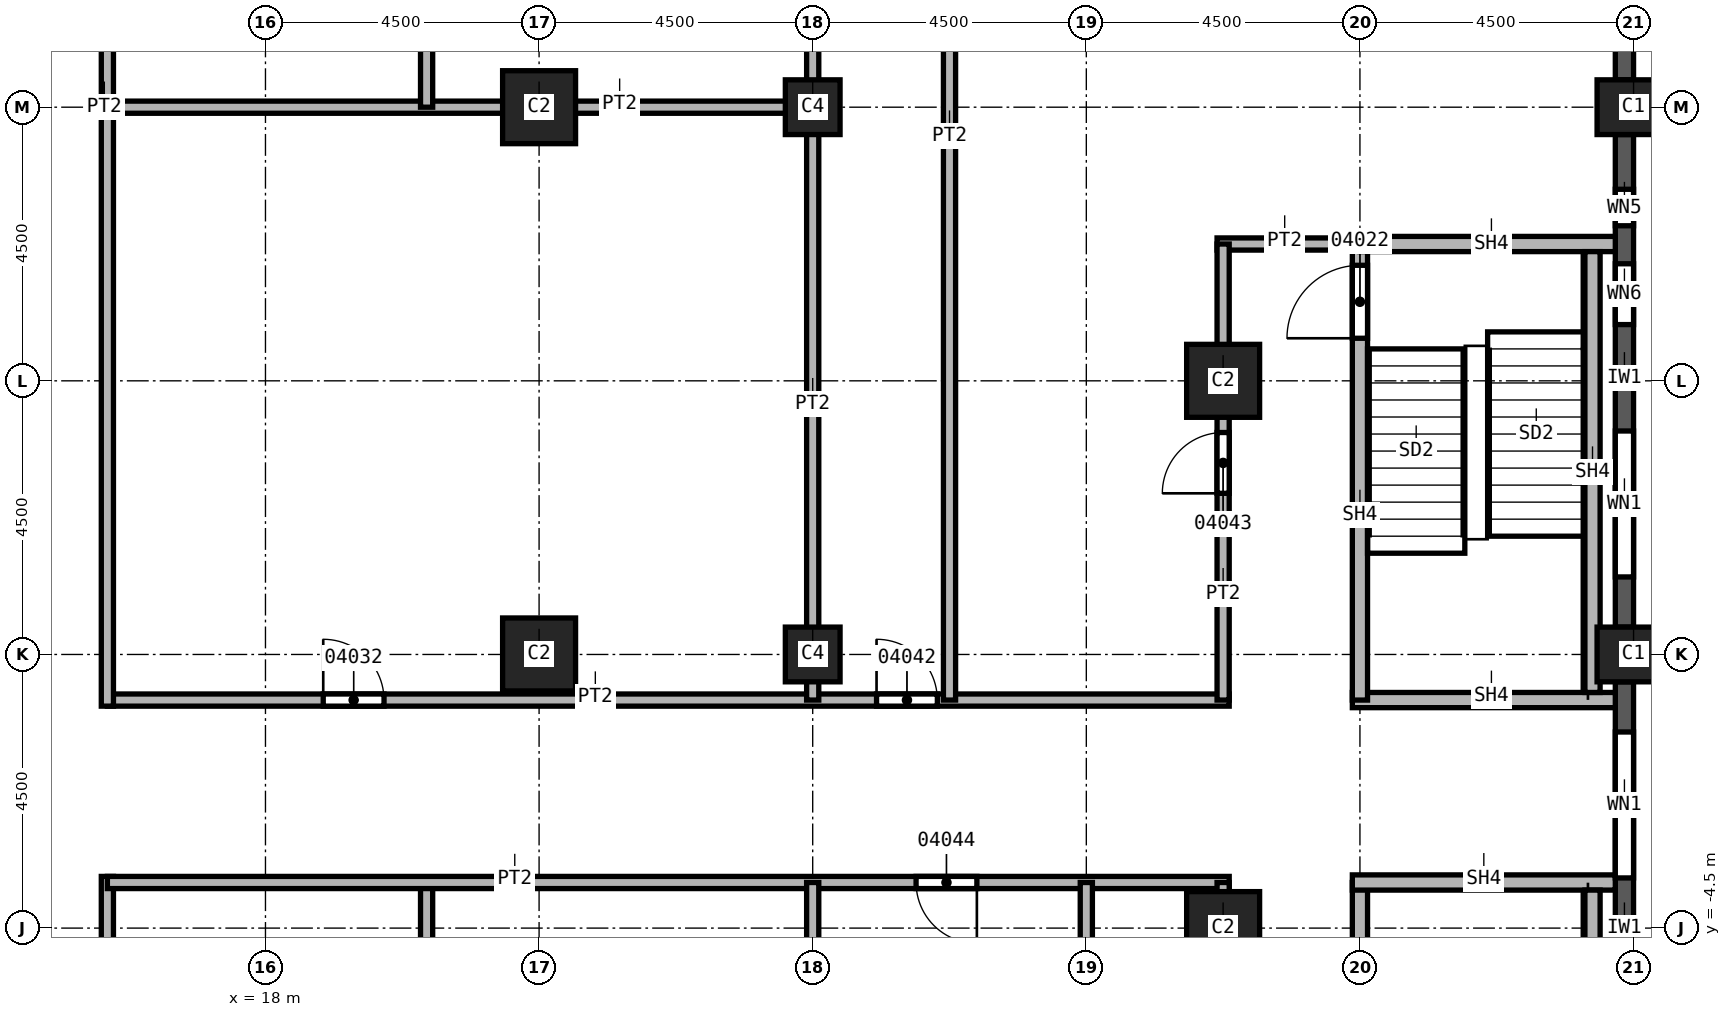
"""IFC4 building model, lengths in metres.
Left out: names, types, materials, properties, quantities, classifications, styles, units other than length and angle.
Written with IfcOpenShell. Run it as: python <this file> out.ifc"""

import sys

from ifc_helpers import new_model, si_unit, direction, frame, frame_2d, origin, origin_2d, place, context, subcontext, project, spatial, rectangle, extrude, element, fill, save


model = new_model("IFC4")
c1 = context("Model", 3, precision=1e-05, world=origin(), true_north=direction((0.0, 1.0)))
c2 = subcontext(c1, "Body", "Model", "MODEL_VIEW")
j1 = project(units=[si_unit("LENGTHUNIT", "METRE"), si_unit("PLANEANGLEUNIT", "RADIAN")], contexts=[c1])
p1 = place(None, origin())
s1 = spatial("IfcSite", under=j1, at=p1, CompositionType="ELEMENT")
p2 = place(p1, origin())
s2 = spatial("IfcBuilding", under=s1, at=p2, CompositionType="ELEMENT")
p3 = place(p2, frame((0.0, 0.0, 104.0)))
s3 = spatial("IfcBuildingStorey", under=s2, at=p3, CompositionType="ELEMENT", Elevation=104.0)
for number, where, z_axis, x_axis in (
    (1, (40.5, 0.0, 0.0), (0.0, 0.0, 1.0), (0.0, 1.0, 0.0)),
    (2, (40.5, 9.0, 0.0), (0.0, 0.0, 1.0), (0.0, 1.0, 0.0)),
):
    element("IfcColumn", number, at=place(p3, frame(where, z_axis=z_axis, x_axis=x_axis)), inside=s3, PredefinedType="COLUMN", context=c2, shape_type="SweptSolid", body=[
        extrude(rectangle(XDim=0.9, YDim=1.2, at=origin_2d()), origin(), (0.0, 0.0, 1.0), 3.7),
    ])
for number, where, z_axis, x_axis in (
    (3, (33.75, 4.5, 0.0), (0.0, 0.0, 1.0), (1.0, 0.0, 0.0)),
    (4, (33.75, -4.5, 0.0), (0.0, 0.0, 1.0), (1.0, 0.0, 0.0)),
    (5, (22.5, 0.0, 0.0), (0.0, 0.0, 1.0), (1.0, 0.0, 0.0)),
    (6, (22.5, 9.0, 0.0), (0.0, 0.0, 1.0), (1.0, 0.0, 0.0)),
):
    element("IfcColumn", number, at=place(p3, frame(where, z_axis=z_axis, x_axis=x_axis)), inside=s3, PredefinedType="COLUMN", context=c2, shape_type="SweptSolid", body=[
        extrude(rectangle(XDim=1.2, YDim=1.2, at=origin_2d()), origin(), (0.0, 0.0, 1.0), 3.7),
    ])
for number, where, z_axis, x_axis in (
    (7, (27.0, 0.0, 0.0), (0.0, 0.0, 1.0), (1.0, 0.0, 0.0)),
    (8, (27.0, 9.0, 0.0), (0.0, 0.0, 1.0), (1.0, 0.0, 0.0)),
):
    element("IfcColumn", number, at=place(p3, frame(where, z_axis=z_axis, x_axis=x_axis)), inside=s3, PredefinedType="COLUMN", context=c2, shape_type="SweptSolid", body=[
        extrude(rectangle(XDim=0.9, YDim=0.9, at=origin_2d()), origin(), (0.0, 0.0, 1.0), 3.7),
    ])
p4 = place(p3, frame((40.35, -8.55, 0.0), z_axis=(0.0, 0.0, 1.0), x_axis=(0.0, 1.0, 0.0)))
e9 = element("IfcWall", 9, at=p4, inside=s3, PredefinedType="SOLIDWALL", context=c2, shape_type="SweptSolid", body=[
    extrude(rectangle(XDim=8.1, YDim=0.3, at=frame_2d((4.05, 0.0))), origin(), (0.0, 0.0, 1.0), 3.1),
])
p5 = place(p4, frame((0.825, 0.0, 0.8)))
e10 = element("IfcOpeningElement", 10, at=p5, cuts=e9, PredefinedType="OPENING", context=c2, shape_type="SweptSolid", body=[
    extrude(rectangle(XDim=2.4, YDim=1.95, at=frame_2d((1.2, 0.975))), frame((0.0, 0.15, 0.0), z_axis=(0.0, -1.0, 0.0), x_axis=(1.0, 0.0, 0.0)), (0.0, 0.0, 1.0), 0.3),
])
p6 = place(p4, frame((4.875, 0.0, 0.8)))
e11 = element("IfcOpeningElement", 11, at=p6, cuts=e9, PredefinedType="OPENING", context=c2, shape_type="SweptSolid", body=[
    extrude(rectangle(XDim=2.4, YDim=1.95, at=frame_2d((1.2, 0.975))), frame((0.0, 0.15, 0.0), z_axis=(0.0, -1.0, 0.0), x_axis=(1.0, 0.0, 0.0)), (0.0, 0.0, 1.0), 0.3),
])
p7 = place(p3, frame((40.35, 0.45, 0.0), z_axis=(0.0, 0.0, 1.0), x_axis=(0.0, 1.0, 0.0)))
e12 = element("IfcWall", 12, at=p7, inside=s3, PredefinedType="SOLIDWALL", context=c2, shape_type="SweptSolid", body=[
    extrude(rectangle(XDim=8.1, YDim=0.3, at=frame_2d((4.05, 0.0))), origin(), (0.0, 0.0, 1.0), 3.1),
])
p8 = place(p7, frame((0.825, 0.0, 0.8)))
e13 = element("IfcOpeningElement", 13, at=p8, cuts=e12, PredefinedType="OPENING", context=c2, shape_type="SweptSolid", body=[
    extrude(rectangle(XDim=2.4, YDim=1.95, at=frame_2d((1.2, 0.975))), frame((0.0, 0.15, 0.0), z_axis=(0.0, -1.0, 0.0), x_axis=(1.0, 0.0, 0.0)), (0.0, 0.0, 1.0), 0.3),
])
p9 = place(p7, frame((4.975, 0.0, 0.8)))
e14 = element("IfcOpeningElement", 14, at=p9, cuts=e12, PredefinedType="OPENING", context=c2, shape_type="SweptSolid", body=[
    extrude(rectangle(XDim=1.0, YDim=1.95, at=frame_2d((0.5, 0.975))), frame((0.0, 0.15, 0.0), z_axis=(0.0, -1.0, 0.0), x_axis=(1.0, 0.0, 0.0)), (0.0, 0.0, 1.0), 0.3),
])
p10 = place(p7, frame((6.6, 0.0, 0.8)))
e15 = element("IfcOpeningElement", 15, at=p10, cuts=e12, PredefinedType="OPENING", context=c2, shape_type="SweptSolid", body=[
    extrude(rectangle(XDim=0.6, YDim=1.95, at=frame_2d((0.3, 0.975))), frame((0.0, 0.15, 0.0), z_axis=(0.0, -1.0, 0.0), x_axis=(1.0, 0.0, 0.0)), (0.0, 0.0, 1.0), 0.3),
])
p11 = place(p3, frame((40.35, 9.45, 0.0), z_axis=(0.0, 0.0, 1.0), x_axis=(0.0, 1.0, 0.0)))
e16 = element("IfcWall", 16, at=p11, inside=s3, PredefinedType="SOLIDWALL", context=c2, shape_type="SweptSolid", body=[
    extrude(rectangle(XDim=3.6, YDim=0.3, at=frame_2d((1.8, 0.0))), origin(), (0.0, 0.0, 1.0), 3.1),
])
p12 = place(p11, frame((0.6, 0.0, 0.8)))
e17 = element("IfcOpeningElement", 17, at=p12, cuts=e16, PredefinedType="OPENING", context=c2, shape_type="SweptSolid", body=[
    extrude(rectangle(XDim=2.4, YDim=1.95, at=frame_2d((1.2, 0.975))), frame((0.0, 0.15, 0.0), z_axis=(0.0, -1.0, 0.0), x_axis=(1.0, 0.0, 0.0)), (0.0, 0.0, 1.0), 0.3),
])
p13 = place(p3, frame((15.4, -3.65, 0.0), z_axis=(0.0, 0.0, 1.0), x_axis=(0.0, -1.0, 0.0)))
e18 = element("IfcWall", 18, at=p13, inside=s3, PredefinedType="PARTITIONING", context=c2, shape_type="SweptSolid", body=[
    extrude(rectangle(XDim=20.85, YDim=0.2, at=frame_2d((10.425, 0.0))), origin(), (0.0, 0.0, 1.0), 3.7),
])
p14 = place(p13, frame((18.85, 0.0, 0.0)))
e19 = element("IfcOpeningElement", 19, at=p14, cuts=e18, PredefinedType="OPENING", context=c2, shape_type="SweptSolid", body=[
    extrude(rectangle(XDim=1.0, YDim=2.1, at=frame_2d((0.5, 1.05))), frame((0.0, 0.1, 0.0), z_axis=(0.0, -1.0, 0.0), x_axis=(1.0, 0.0, 0.0)), (0.0, 0.0, 1.0), 0.2),
])
p15 = place(p13, frame((12.55, 0.0, 0.0)))
e20 = element("IfcOpeningElement", 20, at=p15, cuts=e18, PredefinedType="OPENING", context=c2, shape_type="SweptSolid", body=[
    extrude(rectangle(XDim=1.0, YDim=2.1, at=frame_2d((0.5, 1.05))), frame((0.0, 0.1, 0.0), z_axis=(0.0, -1.0, 0.0), x_axis=(1.0, 0.0, 0.0)), (0.0, 0.0, 1.0), 0.2),
])
p16 = place(p13, frame((4.45, 0.0, 0.0)))
e21 = element("IfcOpeningElement", 21, at=p16, cuts=e18, PredefinedType="OPENING", context=c2, shape_type="SweptSolid", body=[
    extrude(rectangle(XDim=1.0, YDim=2.1, at=frame_2d((0.5, 1.05))), frame((0.0, 0.1, 0.0), z_axis=(0.0, -1.0, 0.0), x_axis=(1.0, 0.0, 0.0)), (0.0, 0.0, 1.0), 0.2),
])
p17 = place(p3, frame((15.4, -0.75, 0.0), z_axis=(0.0, 0.0, 1.0), x_axis=(1.0, 0.0, 0.0)))
e22 = element("IfcWall", 22, at=p17, inside=s3, PredefinedType="PARTITIONING", context=c2, shape_type="SweptSolid", body=[
    extrude(rectangle(XDim=18.45, YDim=0.2, at=frame_2d((9.225, 0.0))), origin(), (0.0, 0.0, 1.0), 3.7),
])
p18 = place(p17, frame((3.55, 0.0, 0.0)))
e23 = element("IfcOpeningElement", 23, at=p18, cuts=e22, PredefinedType="OPENING", context=c2, shape_type="SweptSolid", body=[
    extrude(rectangle(XDim=1.0, YDim=2.1, at=frame_2d((0.5, 1.05))), frame((0.0, 0.1, 0.0), z_axis=(0.0, -1.0, 0.0), x_axis=(1.0, 0.0, 0.0)), (0.0, 0.0, 1.0), 0.2),
])
p19 = place(p17, frame((12.65, 0.0, 0.0)))
e24 = element("IfcOpeningElement", 24, at=p19, cuts=e22, PredefinedType="OPENING", context=c2, shape_type="SweptSolid", body=[
    extrude(rectangle(XDim=1.0, YDim=2.1, at=frame_2d((0.5, 1.05))), frame((0.0, 0.1, 0.0), z_axis=(0.0, -1.0, 0.0), x_axis=(1.0, 0.0, 0.0)), (0.0, 0.0, 1.0), 0.2),
])
p20 = place(p3, frame((15.4, 9.0, 0.0), z_axis=(0.0, 0.0, 1.0), x_axis=(1.0, 0.0, 0.0)))
e25 = element("IfcWall", 25, at=p20, inside=s3, PredefinedType="PARTITIONING", context=c2, shape_type="SweptSolid", body=[
    extrude(rectangle(XDim=11.7, YDim=0.2, at=frame_2d((5.85, 0.0))), origin(), (0.0, 0.0, 1.0), 3.7),
])
p21 = place(p3, frame((15.4, 24.5, 0.0), z_axis=(0.0, 0.0, 1.0), x_axis=(0.0, -1.0, 0.0)))
e26 = element("IfcWall", 26, at=p21, inside=s3, PredefinedType="PARTITIONING", context=c2, shape_type="SweptSolid", body=[
    extrude(rectangle(XDim=25.35, YDim=0.2, at=frame_2d((12.675, 0.0))), origin(), (0.0, 0.0, 1.0), 3.7),
])
p22 = place(p21, frame((4.6, 0.0, 0.0)))
e27 = element("IfcOpeningElement", 27, at=p22, cuts=e26, PredefinedType="OPENING", context=c2, shape_type="SweptSolid", body=[
    extrude(rectangle(XDim=1.0, YDim=2.1, at=frame_2d((0.5, 1.05))), frame((0.0, 0.1, 0.0), z_axis=(0.0, -1.0, 0.0), x_axis=(1.0, 0.0, 0.0)), (0.0, 0.0, 1.0), 0.2),
])
p23 = place(p3, frame((20.65, -3.75, 0.0), z_axis=(0.0, 0.0, 1.0), x_axis=(0.0, -1.0, 0.0)))
e28 = element("IfcWall", 28, at=p23, inside=s3, PredefinedType="PARTITIONING", context=c2, shape_type="SweptSolid", body=[
    extrude(rectangle(XDim=9.75, YDim=0.2, at=frame_2d((4.875, 0.0))), origin(), (0.0, 0.0, 1.0), 3.7),
])
p24 = place(p23, frame((3.4, 0.0, 0.0)))
e29 = element("IfcOpeningElement", 29, at=p24, cuts=e28, PredefinedType="OPENING", context=c2, shape_type="SweptSolid", body=[
    extrude(rectangle(XDim=1.0, YDim=2.1, at=frame_2d((0.5, 1.05))), frame((0.0, 0.1, 0.0), z_axis=(0.0, -1.0, 0.0), x_axis=(1.0, 0.0, 0.0)), (0.0, 0.0, 1.0), 0.2),
])
p25 = place(p3, frame((20.65, 24.5, 0.0), z_axis=(0.0, 0.0, 1.0), x_axis=(0.0, -1.0, 0.0)))
e30 = element("IfcWall", 30, at=p25, inside=s3, PredefinedType="PARTITIONING", context=c2, shape_type="SweptSolid", body=[
    extrude(rectangle(XDim=15.5, YDim=0.2, at=frame_2d((7.75, 0.0))), origin(), (0.0, 0.0, 1.0), 3.7),
])
p26 = place(p25, frame((10.0, 0.0, 0.0)))
e31 = element("IfcOpeningElement", 31, at=p26, cuts=e30, PredefinedType="OPENING", context=c2, shape_type="SweptSolid", body=[
    extrude(rectangle(XDim=1.0, YDim=2.1, at=frame_2d((0.5, 1.05))), frame((0.0, 0.1, 0.0), z_axis=(0.0, -1.0, 0.0), x_axis=(1.0, 0.0, 0.0)), (0.0, 0.0, 1.0), 0.2),
])
p27 = place(p3, frame((33.85, -3.75, 0.0), z_axis=(0.0, 0.0, 1.0), x_axis=(-1.0, 0.0, 0.0)))
e32 = element("IfcWall", 32, at=p27, inside=s3, PredefinedType="PARTITIONING", context=c2, shape_type="SweptSolid", body=[
    extrude(rectangle(XDim=18.45, YDim=0.2, at=frame_2d((9.225, 0.0))), origin(), (0.0, 0.0, 1.0), 3.7),
])
p28 = place(p27, frame((4.15, 0.0, 0.0)))
e33 = element("IfcOpeningElement", 33, at=p28, cuts=e32, PredefinedType="OPENING", context=c2, shape_type="SweptSolid", body=[
    extrude(rectangle(XDim=1.0, YDim=2.1, at=frame_2d((0.5, 1.05))), frame((0.0, 0.1, 0.0), z_axis=(0.0, -1.0, 0.0), x_axis=(1.0, 0.0, 0.0)), (0.0, 0.0, 1.0), 0.2),
])
p29 = place(p3, frame((27.0, -3.75, 0.0), z_axis=(0.0, 0.0, 1.0), x_axis=(0.0, -1.0, 0.0)))
e34 = element("IfcWall", 34, at=p29, inside=s3, PredefinedType="PARTITIONING", context=c2, shape_type="SweptSolid", body=[
    extrude(rectangle(XDim=13.65, YDim=0.2, at=frame_2d((6.825, 0.0))), origin(), (0.0, 0.0, 1.0), 3.7),
])
p30 = place(p3, frame((27.0, 17.4, 0.0), z_axis=(0.0, 0.0, 1.0), x_axis=(0.0, -1.0, 0.0)))
e35 = element("IfcWall", 35, at=p30, inside=s3, PredefinedType="PARTITIONING", context=c2, shape_type="SweptSolid", body=[
    extrude(rectangle(XDim=18.15, YDim=0.2, at=frame_2d((9.075, 0.0))), origin(), (0.0, 0.0, 1.0), 3.7),
])
p31 = place(p3, frame((29.25, 17.7, 0.0), z_axis=(0.0, 0.0, 1.0), x_axis=(0.0, -1.0, 0.0)))
e36 = element("IfcWall", 36, at=p31, inside=s3, PredefinedType="PARTITIONING", context=c2, shape_type="SweptSolid", body=[
    extrude(rectangle(XDim=18.45, YDim=0.2, at=frame_2d((9.225, 0.0))), origin(), (0.0, 0.0, 1.0), 3.7),
])
p32 = place(p3, frame((31.5, -3.75, 0.0), z_axis=(0.0, 0.0, 1.0), x_axis=(0.0, -1.0, 0.0)))
e37 = element("IfcWall", 37, at=p32, inside=s3, PredefinedType="PARTITIONING", context=c2, shape_type="SweptSolid", body=[
    extrude(rectangle(XDim=13.65, YDim=0.2, at=frame_2d((6.825, 0.0))), origin(), (0.0, 0.0, 1.0), 3.7),
])
p33 = place(p3, frame((33.65, 6.75, 0.0), z_axis=(0.0, 0.0, 1.0), x_axis=(1.0, 0.0, 0.0)))
e38 = element("IfcWall", 38, at=p33, inside=s3, PredefinedType="PARTITIONING", context=c2, shape_type="SweptSolid", body=[
    extrude(rectangle(XDim=2.35, YDim=0.2, at=frame_2d((1.175, 0.0))), origin(), (0.0, 0.0, 1.0), 3.7),
])
p34 = place(p3, frame((33.75, -11.25, 0.0), z_axis=(0.0, 0.0, 1.0), x_axis=(0.0, 1.0, 0.0)))
e39 = element("IfcWall", 39, at=p34, inside=s3, PredefinedType="PARTITIONING", context=c2, shape_type="SweptSolid", body=[
    extrude(rectangle(XDim=7.5, YDim=0.2, at=frame_2d((3.75, 0.0))), origin(), (0.0, 0.0, 1.0), 3.7),
])
p35 = place(p34, frame((2.35, 0.0, 0.0)))
e40 = element("IfcOpeningElement", 40, at=p35, cuts=e39, PredefinedType="OPENING", context=c2, shape_type="SweptSolid", body=[
    extrude(rectangle(XDim=1.0, YDim=2.1, at=frame_2d((0.5, 1.05))), frame((0.0, 0.1, 0.0), z_axis=(0.0, -1.0, 0.0), x_axis=(1.0, 0.0, 0.0)), (0.0, 0.0, 1.0), 0.2),
])
p36 = place(p3, frame((33.75, -0.75, 0.0), z_axis=(0.0, 0.0, 1.0), x_axis=(0.0, 1.0, 0.0)))
e41 = element("IfcWall", 41, at=p36, inside=s3, PredefinedType="PARTITIONING", context=c2, shape_type="SweptSolid", body=[
    extrude(rectangle(XDim=7.5, YDim=0.2, at=frame_2d((3.75, 0.0))), origin(), (0.0, 0.0, 1.0), 3.7),
])
p37 = place(p36, frame((3.4, 0.0, 0.0)))
e42 = element("IfcOpeningElement", 42, at=p37, cuts=e41, PredefinedType="OPENING", context=c2, shape_type="SweptSolid", body=[
    extrude(rectangle(XDim=1.0, YDim=2.1, at=frame_2d((0.5, 1.05))), frame((0.0, 0.1, 0.0), z_axis=(0.0, -1.0, 0.0), x_axis=(1.0, 0.0, 0.0)), (0.0, 0.0, 1.0), 0.2),
])
p38 = place(p3, frame((35.875, -0.75, 0.0), z_axis=(0.0, 0.0, 1.0), x_axis=(1.0, 0.0, 0.0)))
e43 = element("IfcWall", 43, at=p38, inside=s3, PredefinedType="SOLIDWALL", context=c2, shape_type="SweptSolid", body=[
    extrude(rectangle(XDim=4.325, YDim=0.25, at=frame_2d((2.163, 0.0))), origin(), (0.0, 0.0, 1.0), 3.7),
])
p39 = place(p3, frame((36.0, -11.375, 0.0), z_axis=(0.0, 0.0, 1.0), x_axis=(0.0, 1.0, 0.0)))
e44 = element("IfcWall", 44, at=p39, inside=s3, PredefinedType="SOLIDWALL", context=c2, shape_type="SweptSolid", body=[
    extrude(rectangle(XDim=7.625, YDim=0.25, at=frame_2d((3.812, 0.0))), origin(), (0.0, 0.0, 1.0), 3.7),
])
p40 = place(p39, frame((0.4, 0.0, 0.0)))
e45 = element("IfcOpeningElement", 45, at=p40, cuts=e44, PredefinedType="OPENING", context=c2, shape_type="SweptSolid", body=[
    extrude(rectangle(XDim=1.2, YDim=2.1, at=frame_2d((0.6, 1.05))), frame((0.0, 0.125, 0.0), z_axis=(0.0, -1.0, 0.0), x_axis=(1.0, 0.0, 0.0)), (0.0, 0.0, 1.0), 0.25),
])
p41 = place(p3, frame((36.0, -0.75, 0.0), z_axis=(0.0, 0.0, 1.0), x_axis=(0.0, 1.0, 0.0)))
e46 = element("IfcWall", 46, at=p41, inside=s3, PredefinedType="SOLIDWALL", context=c2, shape_type="SweptSolid", body=[
    extrude(rectangle(XDim=7.625, YDim=0.25, at=frame_2d((3.812, 0.0))), origin(), (0.0, 0.0, 1.0), 3.7),
])
p42 = place(p41, frame((5.95, 0.0, 0.0)))
e47 = element("IfcOpeningElement", 47, at=p42, cuts=e46, PredefinedType="OPENING", context=c2, shape_type="SweptSolid", body=[
    extrude(rectangle(XDim=1.2, YDim=2.1, at=frame_2d((0.6, 1.05))), frame((0.0, 0.125, 0.0), z_axis=(0.0, -1.0, 0.0), x_axis=(1.0, 0.0, 0.0)), (0.0, 0.0, 1.0), 0.25),
])
p43 = place(p3, frame((36.0, 6.75, 0.0), z_axis=(0.0, 0.0, 1.0), x_axis=(1.0, 0.0, 0.0)))
e48 = element("IfcWall", 48, at=p43, inside=s3, PredefinedType="SOLIDWALL", context=c2, shape_type="SweptSolid", body=[
    extrude(rectangle(XDim=4.2, YDim=0.25, at=frame_2d((2.1, 0.0))), origin(), (0.0, 0.0, 1.0), 3.7),
])
p44 = place(p3, frame((40.2, -3.75, 0.0), z_axis=(0.0, 0.0, 1.0), x_axis=(-1.0, 0.0, 0.0)))
e49 = element("IfcWall", 49, at=p44, inside=s3, PredefinedType="SOLIDWALL", context=c2, shape_type="SweptSolid", body=[
    extrude(rectangle(XDim=4.325, YDim=0.25, at=frame_2d((2.163, 0.0))), origin(), (0.0, 0.0, 1.0), 3.7),
])
for number, where, z_axis, x_axis in (
    (50, (39.825, -11.125, 0.0), (0.0, 0.0, 1.0), (0.0, 1.0, 0.0)),
    (51, (39.825, -0.625, 0.0), (0.0, 0.0, 1.0), (0.0, 1.0, 0.0)),
):
    element("IfcWall", number, at=place(p3, frame(where, z_axis=z_axis, x_axis=x_axis)), inside=s3, PredefinedType="SOLIDWALL", context=c2, shape_type="SweptSolid", body=[
        extrude(rectangle(XDim=7.25, YDim=0.25, at=frame_2d((3.625, 0.0))), origin(), (0.0, 0.0, 1.0), 3.7),
    ])
p45 = place(p6, origin())
e52 = element("IfcWindow", 52, at=p45, inside=s3, PartitioningType="SINGLE_PANEL", PredefinedType="WINDOW", context=c2, shape_type="SweptSolid", body=[
    extrude(rectangle(XDim=2.4, YDim=1.95, at=frame_2d((1.2, 0.975))), frame((0.0, 0.03, 0.0), z_axis=(0.0, -1.0, 0.0), x_axis=(1.0, 0.0, 0.0)), (0.0, 0.0, 1.0), 0.06),
])
fill(e11, e52)
p46 = place(p8, origin())
e53 = element("IfcWindow", 53, at=p46, inside=s3, PartitioningType="SINGLE_PANEL", PredefinedType="WINDOW", context=c2, shape_type="SweptSolid", body=[
    extrude(rectangle(XDim=2.4, YDim=1.95, at=frame_2d((1.2, 0.975))), frame((0.0, 0.03, 0.0), z_axis=(0.0, -1.0, 0.0), x_axis=(1.0, 0.0, 0.0)), (0.0, 0.0, 1.0), 0.06),
])
fill(e13, e53)
p47 = place(p42, origin())
e54 = element("IfcDoor", 54, at=p47, inside=s3, OperationType="SINGLE_SWING_LEFT", PredefinedType="DOOR", context=c2, shape_type="SweptSolid", body=[
    extrude(rectangle(XDim=1.2, YDim=2.1, at=frame_2d((0.6, 1.05))), frame((0.0, 0.025, 0.0), z_axis=(0.0, -1.0, 0.0), x_axis=(1.0, 0.0, 0.0)), (0.0, 0.0, 1.0), 0.05),
])
fill(e47, e54)
p48 = place(p18, origin())
e55 = element("IfcDoor", 55, at=p48, inside=s3, OperationType="SINGLE_SWING_LEFT", PredefinedType="DOOR", context=c2, shape_type="SweptSolid", body=[
    extrude(rectangle(XDim=1.0, YDim=2.1, at=frame_2d((0.5, 1.05))), frame((0.0, 0.025, 0.0), z_axis=(0.0, -1.0, 0.0), x_axis=(1.0, 0.0, 0.0)), (0.0, 0.0, 1.0), 0.05),
])
fill(e23, e55)
p49 = place(p19, origin())
e56 = element("IfcDoor", 56, at=p49, inside=s3, OperationType="SINGLE_SWING_LEFT", PredefinedType="DOOR", context=c2, shape_type="SweptSolid", body=[
    extrude(rectangle(XDim=1.0, YDim=2.1, at=frame_2d((0.5, 1.05))), frame((0.0, 0.025, 0.0), z_axis=(0.0, -1.0, 0.0), x_axis=(1.0, 0.0, 0.0)), (0.0, 0.0, 1.0), 0.05),
])
fill(e24, e56)
p50 = place(p37, origin())
e57 = element("IfcDoor", 57, at=p50, inside=s3, OperationType="SINGLE_SWING_RIGHT", PredefinedType="DOOR", context=c2, shape_type="SweptSolid", body=[
    extrude(rectangle(XDim=1.0, YDim=2.1, at=frame_2d((0.5, 1.05))), frame((0.0, 0.025, 0.0), z_axis=(0.0, -1.0, 0.0), x_axis=(1.0, 0.0, 0.0)), (0.0, 0.0, 1.0), 0.05),
])
fill(e42, e57)
p51 = place(p28, origin())
e58 = element("IfcDoor", 58, at=p51, inside=s3, OperationType="SINGLE_SWING_LEFT", PredefinedType="DOOR", context=c2, shape_type="SweptSolid", body=[
    extrude(rectangle(XDim=1.0, YDim=2.1, at=frame_2d((0.5, 1.05))), frame((0.0, 0.025, 0.0), z_axis=(0.0, -1.0, 0.0), x_axis=(1.0, 0.0, 0.0)), (0.0, 0.0, 1.0), 0.05),
])
fill(e33, e58)
p52 = place(p9, origin())
e59 = element("IfcWindow", 59, at=p52, inside=s3, PartitioningType="SINGLE_PANEL", PredefinedType="WINDOW", context=c2, shape_type="SweptSolid", body=[
    extrude(rectangle(XDim=1.0, YDim=1.95, at=frame_2d((0.5, 0.975))), frame((0.0, 0.03, 0.0), z_axis=(0.0, -1.0, 0.0), x_axis=(1.0, 0.0, 0.0)), (0.0, 0.0, 1.0), 0.06),
])
fill(e14, e59)
p53 = place(p10, origin())
e60 = element("IfcWindow", 60, at=p53, inside=s3, PartitioningType="SINGLE_PANEL", PredefinedType="WINDOW", context=c2, shape_type="SweptSolid", body=[
    extrude(rectangle(XDim=0.6, YDim=1.95, at=frame_2d((0.3, 0.975))), frame((0.0, 0.03, 0.0), z_axis=(0.0, -1.0, 0.0), x_axis=(1.0, 0.0, 0.0)), (0.0, 0.0, 1.0), 0.06),
])
fill(e15, e60)
save(model, sys.argv[1])
